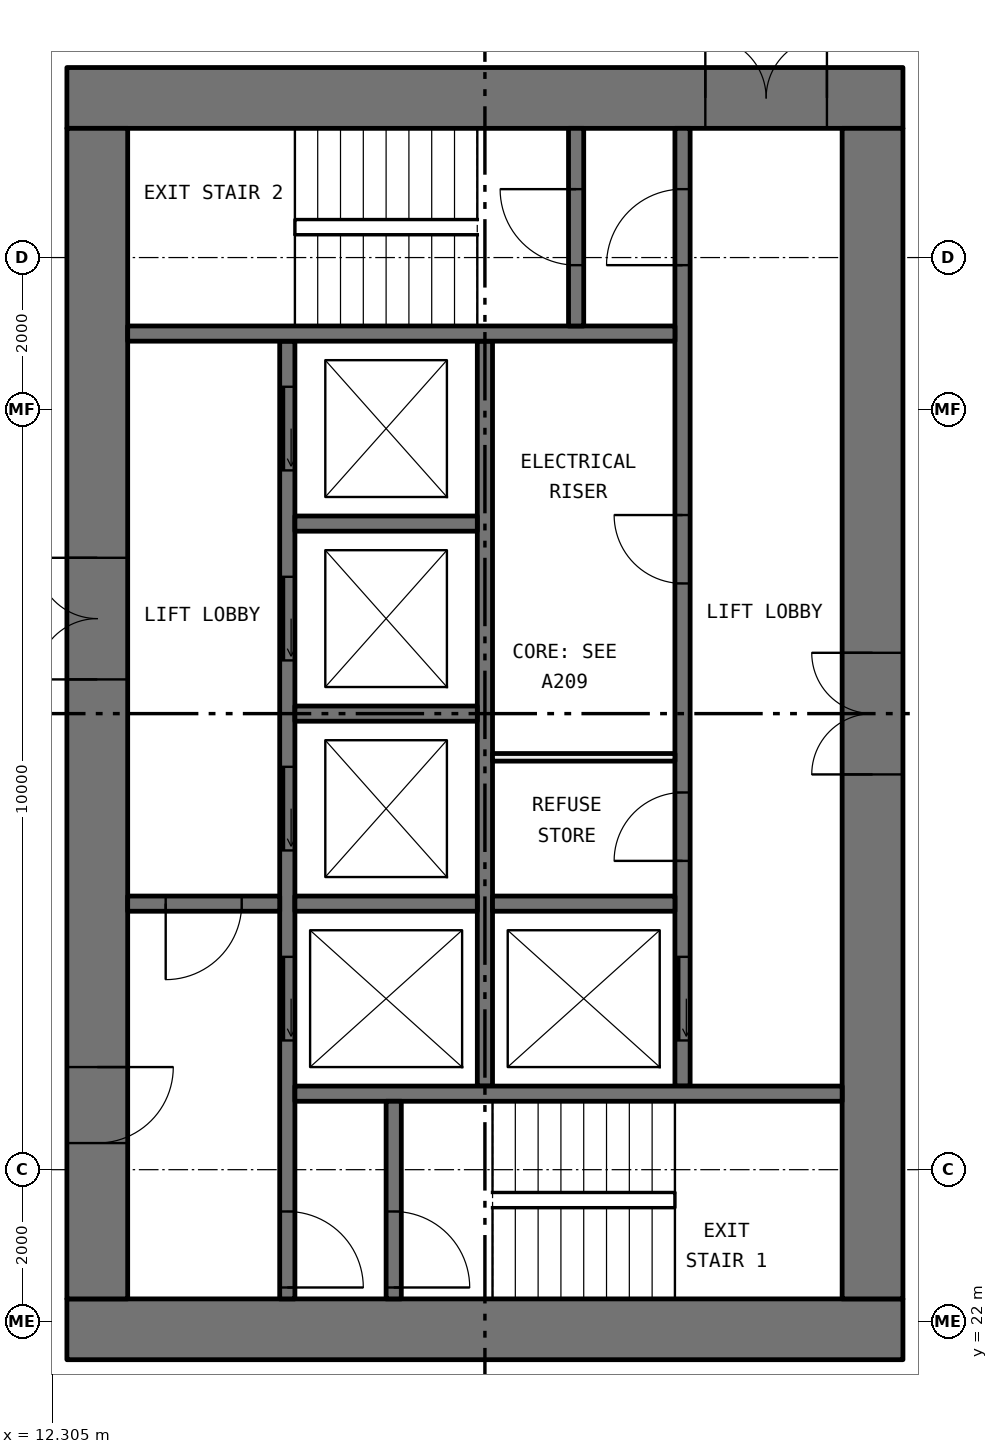
"""IFC4 building model, lengths in metres.
Left out: names, types, materials, properties, quantities, classifications, styles, units other than length and angle.
Written with IfcOpenShell. Run it as: python <this file> out.ifc"""

import sys

from ifc_helpers import new_model, si_unit, direction, frame, frame_2d, origin, place, context, subcontext, project, spatial, rectangle, extrude, element, fill, save


model = new_model("IFC4")
c1 = context("Model", 3, precision=1e-05, world=origin(), true_north=direction((0.0, 1.0)))
c2 = subcontext(c1, "Body", "Model", "MODEL_VIEW")
j1 = project(units=[si_unit("LENGTHUNIT", "METRE"), si_unit("PLANEANGLEUNIT", "RADIAN")], contexts=[c1])
p1 = place(None, origin())
s1 = spatial("IfcSite", under=j1, at=p1, CompositionType="ELEMENT")
p2 = place(p1, origin())
s2 = spatial("IfcBuilding", under=s1, at=p2, CompositionType="ELEMENT")
p3 = place(p2, frame((0.0, 0.0, 40.35)))
s3 = spatial("IfcBuildingStorey", under=s2, at=p3, CompositionType="ELEMENT", Elevation=40.35)
p4 = place(p3, frame((12.5, 21.9, 0.0), z_axis=(0.0, 0.0, 1.0), x_axis=(1.0, 0.0, 0.0)))
e1 = element("IfcWall", 1, at=p4, inside=s3, PredefinedType="SHEAR", context=c2, shape_type="SweptSolid", body=[
    extrude(rectangle(XDim=11.0, YDim=0.8, at=frame_2d((5.5, 0.0))), origin(), (0.0, 0.0, 1.0), 3.05),
])
p5 = place(p3, frame((12.5, 38.1, 0.0), z_axis=(0.0, 0.0, 1.0), x_axis=(1.0, 0.0, 0.0)))
e2 = element("IfcWall", 2, at=p5, inside=s3, PredefinedType="SHEAR", context=c2, shape_type="SweptSolid", body=[
    extrude(rectangle(XDim=11.0, YDim=0.8, at=frame_2d((5.5, 0.0))), origin(), (0.0, 0.0, 1.0), 3.05),
])
p6 = place(p5, frame((8.4, 0.0, 0.0)))
e3 = element("IfcOpeningElement", 3, at=p6, cuts=e2, PredefinedType="OPENING", context=c2, shape_type="SweptSolid", body=[
    extrude(rectangle(XDim=1.6, YDim=2.1, at=frame_2d((0.8, 1.05))), frame((0.0, 0.41, 0.0), z_axis=(0.0, -1.0, 0.0), x_axis=(1.0, 0.0, 0.0)), (0.0, 0.0, 1.0), 0.82),
])
p7 = place(p3, frame((12.9, 22.3, 0.0), z_axis=(0.0, 0.0, 1.0), x_axis=(0.0, 1.0, 0.0)))
e4 = element("IfcWall", 4, at=p7, inside=s3, PredefinedType="SHEAR", context=c2, shape_type="SweptSolid", body=[
    extrude(rectangle(XDim=15.4, YDim=0.8, at=frame_2d((7.7, 0.0))), origin(), (0.0, 0.0, 1.0), 3.05),
])
p8 = place(p7, frame((8.15, 0.0, 0.0)))
e5 = element("IfcOpeningElement", 5, at=p8, cuts=e4, PredefinedType="OPENING", context=c2, shape_type="SweptSolid", body=[
    extrude(rectangle(XDim=1.6, YDim=2.1, at=frame_2d((0.8, 1.05))), frame((0.0, 0.41, 0.0), z_axis=(0.0, -1.0, 0.0), x_axis=(1.0, 0.0, 0.0)), (0.0, 0.0, 1.0), 0.82),
])
p9 = place(p7, frame((2.05, 0.0, 0.0)))
e6 = element("IfcOpeningElement", 6, at=p9, cuts=e4, PredefinedType="OPENING", context=c2, shape_type="SweptSolid", body=[
    extrude(rectangle(XDim=1.0, YDim=2.1, at=frame_2d((0.5, 1.05))), frame((0.0, 0.41, 0.0), z_axis=(0.0, -1.0, 0.0), x_axis=(1.0, 0.0, 0.0)), (0.0, 0.0, 1.0), 0.82),
])
p10 = place(p3, frame((23.1, 22.3, 0.0), z_axis=(0.0, 0.0, 1.0), x_axis=(0.0, 1.0, 0.0)))
e7 = element("IfcWall", 7, at=p10, inside=s3, PredefinedType="SHEAR", context=c2, shape_type="SweptSolid", body=[
    extrude(rectangle(XDim=15.4, YDim=0.8, at=frame_2d((7.7, 0.0))), origin(), (0.0, 0.0, 1.0), 3.05),
])
p11 = place(p10, frame((6.9, 0.0, 0.0)))
e8 = element("IfcOpeningElement", 8, at=p11, cuts=e7, PredefinedType="OPENING", context=c2, shape_type="SweptSolid", body=[
    extrude(rectangle(XDim=1.6, YDim=2.1, at=frame_2d((0.8, 1.05))), frame((0.0, 0.41, 0.0), z_axis=(0.0, -1.0, 0.0), x_axis=(1.0, 0.0, 0.0)), (0.0, 0.0, 1.0), 0.82),
])
p12 = place(p3, frame((15.4, 22.3, 0.0), z_axis=(0.0, 0.0, 1.0), x_axis=(0.0, 1.0, 0.0)))
e9 = element("IfcWall", 9, at=p12, inside=s3, PredefinedType="SOLIDWALL", context=c2, shape_type="SweptSolid", body=[
    extrude(rectangle(XDim=12.6, YDim=0.2, at=frame_2d((6.3, 0.0))), origin(), (0.0, 0.0, 1.0), 3.05),
])
p13 = place(p12, frame((3.4, 0.0, 0.0)))
e10 = element("IfcOpeningElement", 10, at=p13, cuts=e9, PredefinedType="OPENING", context=c2, shape_type="SweptSolid", body=[
    extrude(rectangle(XDim=1.1, YDim=2.1, at=frame_2d((0.55, 1.05))), frame((0.0, 0.11, 0.0), z_axis=(0.0, -1.0, 0.0), x_axis=(1.0, 0.0, 0.0)), (0.0, 0.0, 1.0), 0.22),
])
p14 = place(p12, frame((5.9, 0.0, 0.0)))
e11 = element("IfcOpeningElement", 11, at=p14, cuts=e9, PredefinedType="OPENING", context=c2, shape_type="SweptSolid", body=[
    extrude(rectangle(XDim=1.1, YDim=2.1, at=frame_2d((0.55, 1.05))), frame((0.0, 0.11, 0.0), z_axis=(0.0, -1.0, 0.0), x_axis=(1.0, 0.0, 0.0)), (0.0, 0.0, 1.0), 0.22),
])
p15 = place(p12, frame((8.4, 0.0, 0.0)))
e12 = element("IfcOpeningElement", 12, at=p15, cuts=e9, PredefinedType="OPENING", context=c2, shape_type="SweptSolid", body=[
    extrude(rectangle(XDim=1.1, YDim=2.1, at=frame_2d((0.55, 1.05))), frame((0.0, 0.11, 0.0), z_axis=(0.0, -1.0, 0.0), x_axis=(1.0, 0.0, 0.0)), (0.0, 0.0, 1.0), 0.22),
])
p16 = place(p12, frame((10.9, 0.0, 0.0)))
e13 = element("IfcOpeningElement", 13, at=p16, cuts=e9, PredefinedType="OPENING", context=c2, shape_type="SweptSolid", body=[
    extrude(rectangle(XDim=1.1, YDim=2.1, at=frame_2d((0.55, 1.05))), frame((0.0, 0.11, 0.0), z_axis=(0.0, -1.0, 0.0), x_axis=(1.0, 0.0, 0.0)), (0.0, 0.0, 1.0), 0.22),
])
p17 = place(p12, frame((0.15, 0.0, 0.0)))
e14 = element("IfcOpeningElement", 14, at=p17, cuts=e9, PredefinedType="OPENING", context=c2, shape_type="SweptSolid", body=[
    extrude(rectangle(XDim=1.0, YDim=2.1, at=frame_2d((0.5, 1.05))), frame((0.0, 0.11, 0.0), z_axis=(0.0, -1.0, 0.0), x_axis=(1.0, 0.0, 0.0)), (0.0, 0.0, 1.0), 0.22),
])
p18 = place(p3, frame((20.6, 25.1, 0.0), z_axis=(0.0, 0.0, 1.0), x_axis=(0.0, 1.0, 0.0)))
e15 = element("IfcWall", 15, at=p18, inside=s3, PredefinedType="SOLIDWALL", context=c2, shape_type="SweptSolid", body=[
    extrude(rectangle(XDim=12.6, YDim=0.2, at=frame_2d((6.3, 0.0))), origin(), (0.0, 0.0, 1.0), 3.05),
])
p19 = place(p18, frame((0.6, 0.0, 0.0)))
e16 = element("IfcOpeningElement", 16, at=p19, cuts=e15, PredefinedType="OPENING", context=c2, shape_type="SweptSolid", body=[
    extrude(rectangle(XDim=1.1, YDim=2.1, at=frame_2d((0.55, 1.05))), frame((0.0, 0.11, 0.0), z_axis=(0.0, -1.0, 0.0), x_axis=(1.0, 0.0, 0.0)), (0.0, 0.0, 1.0), 0.22),
])
p20 = place(p18, frame((10.8, 0.0, 0.0)))
e17 = element("IfcOpeningElement", 17, at=p20, cuts=e15, PredefinedType="OPENING", context=c2, shape_type="SweptSolid", body=[
    extrude(rectangle(XDim=1.0, YDim=2.1, at=frame_2d((0.5, 1.05))), frame((0.0, 0.11, 0.0), z_axis=(0.0, -1.0, 0.0), x_axis=(1.0, 0.0, 0.0)), (0.0, 0.0, 1.0), 0.22),
])
p21 = place(p18, frame((2.962, 0.0, 0.0)))
e18 = element("IfcOpeningElement", 18, at=p21, cuts=e15, PredefinedType="OPENING", context=c2, shape_type="SweptSolid", body=[
    extrude(rectangle(XDim=0.9, YDim=2.1, at=frame_2d((0.45, 1.05))), frame((0.0, 0.11, 0.0), z_axis=(0.0, -1.0, 0.0), x_axis=(1.0, 0.0, 0.0)), (0.0, 0.0, 1.0), 0.22),
])
p22 = place(p18, frame((6.613, 0.0, 0.0)))
e19 = element("IfcOpeningElement", 19, at=p22, cuts=e15, PredefinedType="OPENING", context=c2, shape_type="SweptSolid", body=[
    extrude(rectangle(XDim=0.9, YDim=2.1, at=frame_2d((0.45, 1.05))), frame((0.0, 0.11, 0.0), z_axis=(0.0, -1.0, 0.0), x_axis=(1.0, 0.0, 0.0)), (0.0, 0.0, 1.0), 0.22),
])
p23 = place(p3, frame((18.0, 25.1, 0.0), z_axis=(0.0, 0.0, 1.0), x_axis=(0.0, 1.0, 0.0)))
e20 = element("IfcWall", 20, at=p23, inside=s3, PredefinedType="SOLIDWALL", context=c2, shape_type="SweptSolid", body=[
    extrude(rectangle(XDim=9.8, YDim=0.2, at=frame_2d((4.9, 0.0))), origin(), (0.0, 0.0, 1.0), 3.05),
])
for number, where, z_axis, x_axis in (
    (21, (15.5, 25.0, 0.0), (0.0, 0.0, 1.0), (1.0, 0.0, 0.0)),
    (22, (13.3, 35.0, 0.0), (0.0, 0.0, 1.0), (1.0, 0.0, 0.0)),
):
    element("IfcWall", number, at=place(p3, frame(where, z_axis=z_axis, x_axis=x_axis)), inside=s3, PredefinedType="SOLIDWALL", context=c2, shape_type="SweptSolid", body=[
        extrude(rectangle(XDim=7.2, YDim=0.2, at=frame_2d((3.6, 0.0))), origin(), (0.0, 0.0, 1.0), 3.05),
    ])
p24 = place(p3, frame((13.3, 27.5, 0.0), z_axis=(0.0, 0.0, 1.0), x_axis=(1.0, 0.0, 0.0)))
e23 = element("IfcWall", 23, at=p24, inside=s3, PredefinedType="SOLIDWALL", context=c2, shape_type="SweptSolid", body=[
    extrude(rectangle(XDim=2.0, YDim=0.2, at=frame_2d((1.0, 0.0))), origin(), (0.0, 0.0, 1.0), 3.05),
])
p25 = place(p24, frame((0.5, 0.0, 0.0)))
e24 = element("IfcOpeningElement", 24, at=p25, cuts=e23, PredefinedType="OPENING", context=c2, shape_type="SweptSolid", body=[
    extrude(rectangle(XDim=1.0, YDim=2.1, at=frame_2d((0.5, 1.05))), frame((0.0, 0.11, 0.0), z_axis=(0.0, -1.0, 0.0), x_axis=(1.0, 0.0, 0.0)), (0.0, 0.0, 1.0), 0.22),
])
p26 = place(p3, frame((16.8, 22.3, 0.0), z_axis=(0.0, 0.0, 1.0), x_axis=(0.0, 1.0, 0.0)))
e25 = element("IfcWall", 25, at=p26, inside=s3, PredefinedType="SOLIDWALL", context=c2, shape_type="SweptSolid", body=[
    extrude(rectangle(XDim=2.6, YDim=0.2, at=frame_2d((1.3, 0.0))), origin(), (0.0, 0.0, 1.0), 3.05),
])
p27 = place(p26, frame((0.15, 0.0, 0.0)))
e26 = element("IfcOpeningElement", 26, at=p27, cuts=e25, PredefinedType="OPENING", context=c2, shape_type="SweptSolid", body=[
    extrude(rectangle(XDim=1.0, YDim=2.1, at=frame_2d((0.5, 1.05))), frame((0.0, 0.11, 0.0), z_axis=(0.0, -1.0, 0.0), x_axis=(1.0, 0.0, 0.0)), (0.0, 0.0, 1.0), 0.22),
])
p28 = place(p3, frame((19.2, 35.1, 0.0), z_axis=(0.0, 0.0, 1.0), x_axis=(0.0, 1.0, 0.0)))
e27 = element("IfcWall", 27, at=p28, inside=s3, PredefinedType="SOLIDWALL", context=c2, shape_type="SweptSolid", body=[
    extrude(rectangle(XDim=2.6, YDim=0.2, at=frame_2d((1.3, 0.0))), origin(), (0.0, 0.0, 1.0), 3.05),
])
p29 = place(p28, frame((0.8, 0.0, 0.0)))
e28 = element("IfcOpeningElement", 28, at=p29, cuts=e27, PredefinedType="OPENING", context=c2, shape_type="SweptSolid", body=[
    extrude(rectangle(XDim=1.0, YDim=2.1, at=frame_2d((0.5, 1.05))), frame((0.0, 0.11, 0.0), z_axis=(0.0, -1.0, 0.0), x_axis=(1.0, 0.0, 0.0)), (0.0, 0.0, 1.0), 0.22),
])
for number, where, z_axis, x_axis in (
    (29, (15.5, 27.5, 0.0), (0.0, 0.0, 1.0), (1.0, 0.0, 0.0)),
    (30, (15.5, 30.0, 0.0), (0.0, 0.0, 1.0), (1.0, 0.0, 0.0)),
    (31, (15.5, 32.5, 0.0), (0.0, 0.0, 1.0), (1.0, 0.0, 0.0)),
    (32, (18.1, 27.5, 0.0), (0.0, 0.0, 1.0), (1.0, 0.0, 0.0)),
):
    element("IfcWall", number, at=place(p3, frame(where, z_axis=z_axis, x_axis=x_axis)), inside=s3, PredefinedType="SOLIDWALL", context=c2, shape_type="SweptSolid", body=[
        extrude(rectangle(XDim=2.4, YDim=0.2, at=frame_2d((1.2, 0.0))), origin(), (0.0, 0.0, 1.0), 3.05),
    ])
p30 = place(p3, frame((18.1, 29.425, 0.0), z_axis=(0.0, 0.0, 1.0), x_axis=(1.0, 0.0, 0.0)))
e33 = element("IfcWall", 33, at=p30, inside=s3, PredefinedType="PARTITIONING", context=c2, shape_type="SweptSolid", body=[
    extrude(rectangle(XDim=2.4, YDim=0.1, at=frame_2d((1.2, 0.0))), origin(), (0.0, 0.0, 1.0), 3.05),
])
p31 = place(p19, origin())
e34 = element("IfcDoor", 34, at=p31, inside=s3, OperationType="SLIDING_TO_LEFT", PredefinedType="DOOR", context=c2, shape_type="SweptSolid", body=[
    extrude(rectangle(XDim=1.1, YDim=2.1, at=frame_2d((0.55, 1.05))), frame((0.0, 0.025, 0.0), z_axis=(0.0, -1.0, 0.0), x_axis=(1.0, 0.0, 0.0)), (0.0, 0.0, 1.0), 0.05),
])
fill(e16, e34)
p32 = place(p13, origin())
e35 = element("IfcDoor", 35, at=p32, inside=s3, OperationType="SLIDING_TO_LEFT", PredefinedType="DOOR", context=c2, shape_type="SweptSolid", body=[
    extrude(rectangle(XDim=1.1, YDim=2.1, at=frame_2d((0.55, 1.05))), frame((0.0, 0.025, 0.0), z_axis=(0.0, -1.0, 0.0), x_axis=(1.0, 0.0, 0.0)), (0.0, 0.0, 1.0), 0.05),
])
fill(e10, e35)
p33 = place(p14, origin())
e36 = element("IfcDoor", 36, at=p33, inside=s3, OperationType="SLIDING_TO_LEFT", PredefinedType="DOOR", context=c2, shape_type="SweptSolid", body=[
    extrude(rectangle(XDim=1.1, YDim=2.1, at=frame_2d((0.55, 1.05))), frame((0.0, 0.025, 0.0), z_axis=(0.0, -1.0, 0.0), x_axis=(1.0, 0.0, 0.0)), (0.0, 0.0, 1.0), 0.05),
])
fill(e11, e36)
p34 = place(p15, origin())
e37 = element("IfcDoor", 37, at=p34, inside=s3, OperationType="SLIDING_TO_LEFT", PredefinedType="DOOR", context=c2, shape_type="SweptSolid", body=[
    extrude(rectangle(XDim=1.1, YDim=2.1, at=frame_2d((0.55, 1.05))), frame((0.0, 0.025, 0.0), z_axis=(0.0, -1.0, 0.0), x_axis=(1.0, 0.0, 0.0)), (0.0, 0.0, 1.0), 0.05),
])
fill(e12, e37)
p35 = place(p16, origin())
e38 = element("IfcDoor", 38, at=p35, inside=s3, OperationType="SLIDING_TO_LEFT", PredefinedType="DOOR", context=c2, shape_type="SweptSolid", body=[
    extrude(rectangle(XDim=1.1, YDim=2.1, at=frame_2d((0.55, 1.05))), frame((0.0, 0.025, 0.0), z_axis=(0.0, -1.0, 0.0), x_axis=(1.0, 0.0, 0.0)), (0.0, 0.0, 1.0), 0.05),
])
fill(e13, e38)
p36 = place(p27, frame((1.0, 0.0, 0.0), x_axis=(-1.0, 0.0, 0.0)))
e39 = element("IfcDoor", 39, at=p36, inside=s3, OperationType="SINGLE_SWING_LEFT", PredefinedType="DOOR", context=c2, shape_type="SweptSolid", body=[
    extrude(rectangle(XDim=1.0, YDim=2.1, at=frame_2d((0.5, 1.05))), frame((0.0, 0.025, 0.0), z_axis=(0.0, -1.0, 0.0), x_axis=(1.0, 0.0, 0.0)), (0.0, 0.0, 1.0), 0.05),
])
fill(e26, e39)
p37 = place(p17, frame((1.0, 0.0, 0.0), x_axis=(-1.0, 0.0, 0.0)))
e40 = element("IfcDoor", 40, at=p37, inside=s3, OperationType="SINGLE_SWING_LEFT", PredefinedType="DOOR", context=c2, shape_type="SweptSolid", body=[
    extrude(rectangle(XDim=1.0, YDim=2.1, at=frame_2d((0.5, 1.05))), frame((0.0, 0.025, 0.0), z_axis=(0.0, -1.0, 0.0), x_axis=(1.0, 0.0, 0.0)), (0.0, 0.0, 1.0), 0.05),
])
fill(e14, e40)
p38 = place(p20, origin())
e41 = element("IfcDoor", 41, at=p38, inside=s3, OperationType="SINGLE_SWING_RIGHT", PredefinedType="DOOR", context=c2, shape_type="SweptSolid", body=[
    extrude(rectangle(XDim=1.0, YDim=2.1, at=frame_2d((0.5, 1.05))), frame((0.0, 0.025, 0.0), z_axis=(0.0, -1.0, 0.0), x_axis=(1.0, 0.0, 0.0)), (0.0, 0.0, 1.0), 0.05),
])
fill(e17, e41)
p39 = place(p29, origin())
e42 = element("IfcDoor", 42, at=p39, inside=s3, OperationType="SINGLE_SWING_LEFT", PredefinedType="DOOR", context=c2, shape_type="SweptSolid", body=[
    extrude(rectangle(XDim=1.0, YDim=2.1, at=frame_2d((0.5, 1.05))), frame((0.0, 0.025, 0.0), z_axis=(0.0, -1.0, 0.0), x_axis=(1.0, 0.0, 0.0)), (0.0, 0.0, 1.0), 0.05),
])
fill(e28, e42)
p40 = place(p25, frame((1.0, 0.0, 0.0), x_axis=(-1.0, 0.0, 0.0)))
e43 = element("IfcDoor", 43, at=p40, inside=s3, OperationType="SINGLE_SWING_LEFT", PredefinedType="DOOR", context=c2, shape_type="SweptSolid", body=[
    extrude(rectangle(XDim=1.0, YDim=2.1, at=frame_2d((0.5, 1.05))), frame((0.0, 0.025, 0.0), z_axis=(0.0, -1.0, 0.0), x_axis=(1.0, 0.0, 0.0)), (0.0, 0.0, 1.0), 0.05),
])
fill(e24, e43)
p41 = place(p8, origin())
e44 = element("IfcDoor", 44, at=p41, inside=s3, OperationType="DOUBLE_DOOR_SINGLE_SWING", PredefinedType="DOOR", context=c2, shape_type="SweptSolid", body=[
    extrude(rectangle(XDim=1.6, YDim=2.1, at=frame_2d((0.8, 1.05))), frame((0.0, 0.025, 0.0), z_axis=(0.0, -1.0, 0.0), x_axis=(1.0, 0.0, 0.0)), (0.0, 0.0, 1.0), 0.05),
])
fill(e5, e44)
p42 = place(p9, frame((1.0, 0.0, 0.0), x_axis=(-1.0, 0.0, 0.0)))
e45 = element("IfcDoor", 45, at=p42, inside=s3, OperationType="SINGLE_SWING_RIGHT", PredefinedType="DOOR", context=c2, shape_type="SweptSolid", body=[
    extrude(rectangle(XDim=1.0, YDim=2.1, at=frame_2d((0.5, 1.05))), frame((0.0, 0.025, 0.0), z_axis=(0.0, -1.0, 0.0), x_axis=(1.0, 0.0, 0.0)), (0.0, 0.0, 1.0), 0.05),
])
fill(e6, e45)
p43 = place(p6, origin())
e46 = element("IfcDoor", 46, at=p43, inside=s3, OperationType="DOUBLE_DOOR_SINGLE_SWING", PredefinedType="DOOR", context=c2, shape_type="SweptSolid", body=[
    extrude(rectangle(XDim=1.6, YDim=2.1, at=frame_2d((0.8, 1.05))), frame((0.0, 0.025, 0.0), z_axis=(0.0, -1.0, 0.0), x_axis=(1.0, 0.0, 0.0)), (0.0, 0.0, 1.0), 0.05),
])
fill(e3, e46)
p44 = place(p11, origin())
e47 = element("IfcDoor", 47, at=p44, inside=s3, OperationType="DOUBLE_DOOR_SINGLE_SWING", PredefinedType="DOOR", context=c2, shape_type="SweptSolid", body=[
    extrude(rectangle(XDim=1.6, YDim=2.1, at=frame_2d((0.8, 1.05))), frame((0.0, 0.025, 0.0), z_axis=(0.0, -1.0, 0.0), x_axis=(1.0, 0.0, 0.0)), (0.0, 0.0, 1.0), 0.05),
])
fill(e8, e47)
p45 = place(p21, origin())
e48 = element("IfcDoor", 48, at=p45, inside=s3, OperationType="SINGLE_SWING_RIGHT", PredefinedType="DOOR", context=c2, shape_type="SweptSolid", body=[
    extrude(rectangle(XDim=0.9, YDim=2.1, at=frame_2d((0.45, 1.05))), frame((0.0, 0.025, 0.0), z_axis=(0.0, -1.0, 0.0), x_axis=(1.0, 0.0, 0.0)), (0.0, 0.0, 1.0), 0.05),
])
fill(e18, e48)
p46 = place(p22, origin())
e49 = element("IfcDoor", 49, at=p46, inside=s3, OperationType="SINGLE_SWING_LEFT", PredefinedType="DOOR", context=c2, shape_type="SweptSolid", body=[
    extrude(rectangle(XDim=0.9, YDim=2.1, at=frame_2d((0.45, 1.05))), frame((0.0, 0.025, 0.0), z_axis=(0.0, -1.0, 0.0), x_axis=(1.0, 0.0, 0.0)), (0.0, 0.0, 1.0), 0.05),
])
fill(e19, e49)
save(model, sys.argv[1])
